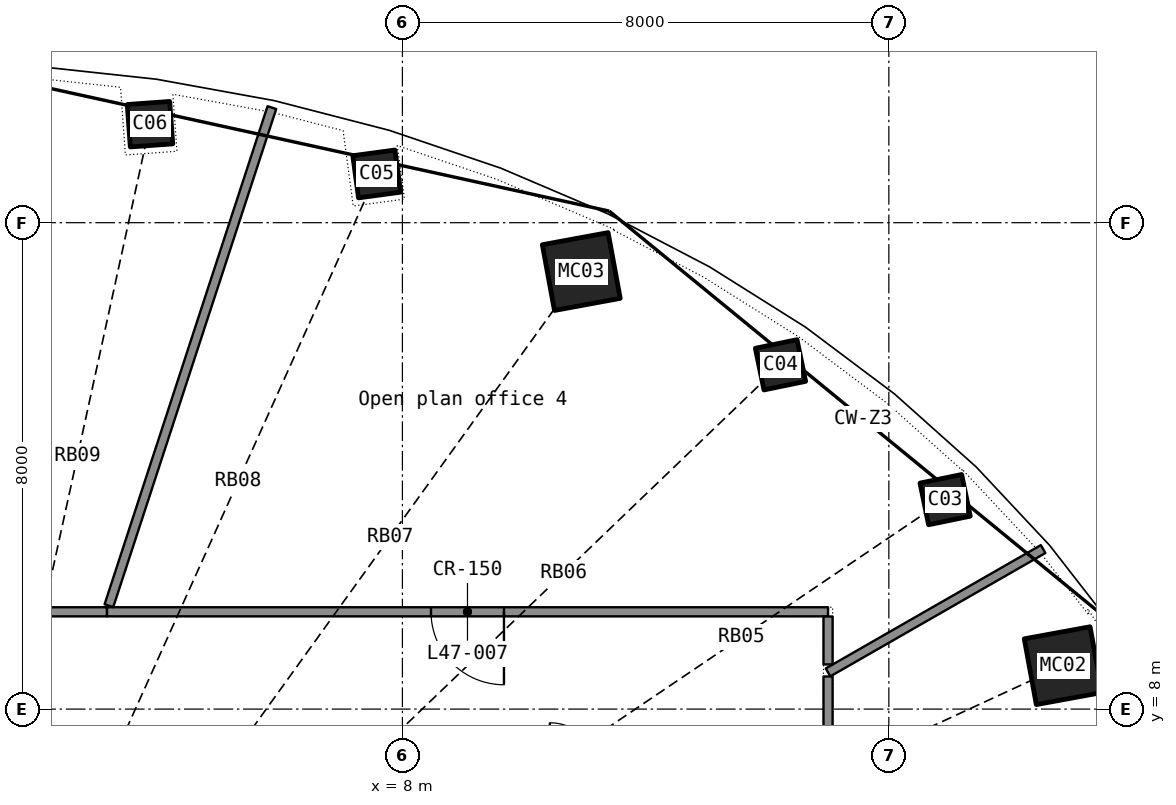
"""IFC4 building model, lengths in metres.
Left out: names, types, materials, properties, quantities, classifications, styles, units other than length and angle.
Written with IfcOpenShell. Run it as: python <this file> out.ifc"""

import sys

from ifc_helpers import new_model, si_unit, direction, frame, frame_2d, origin, origin_2d, place, context, subcontext, project, spatial, rectangle, hollow_rectangle, extrude, element, fill, save


model = new_model("IFC4")
c1 = context("Model", 3, precision=1e-05, world=origin(), true_north=direction((0.0, 1.0)))
c2 = subcontext(c1, "Body", "Model", "MODEL_VIEW")
j1 = project(units=[si_unit("LENGTHUNIT", "METRE"), si_unit("PLANEANGLEUNIT", "RADIAN")], contexts=[c1])
p1 = place(None, origin())
s1 = spatial("IfcSite", under=j1, at=p1, CompositionType="ELEMENT")
p2 = place(p1, origin())
s2 = spatial("IfcBuilding", under=s1, at=p2, CompositionType="ELEMENT")
p3 = place(p2, frame((0.0, 0.0, 194.1)))
s3 = spatial("IfcBuildingStorey", under=s2, at=p3, CompositionType="ELEMENT", Elevation=194.1)
p4 = place(p3, frame((18.867, 8.714, 0.0), z_axis=(-0.029940667, -0.01417895, 0.999451106), x_axis=(0.583859188, -0.811832967, 0.005973473)))
e1 = element("IfcColumn", 1, at=p4, inside=s3, PredefinedType="COLUMN", context=c2, shape_type="SweptSolid", body=[
    extrude(hollow_rectangle(XDim=1.1, YDim=1.1, WallThickness=0.032, at=origin_2d()), origin(), (0.0, 0.0, 1.0), 3.702),
])
p5 = place(p3, frame((16.926, 11.445, 0.0), z_axis=(-0.026512179, -0.018202391, 0.999482755), x_axis=(0.720419372, -0.693508429, 0.006479727)))
e2 = element("IfcColumn", 2, at=p5, inside=s3, PredefinedType="COLUMN", context=c2, shape_type="SweptSolid", body=[
    extrude(hollow_rectangle(XDim=0.7, YDim=0.7, WallThickness=0.025, at=origin_2d()), origin(), (0.0, 0.0, 1.0), 3.702),
])
p6 = place(p3, frame((14.218, 13.662, 0.0), z_axis=(-0.022226156, -0.021698532, 0.999517469), x_axis=(0.828497152, -0.559958207, 0.00626706)))
e3 = element("IfcColumn", 3, at=p6, inside=s3, PredefinedType="COLUMN", context=c2, shape_type="SweptSolid", body=[
    extrude(hollow_rectangle(XDim=0.7, YDim=0.7, WallThickness=0.025, at=origin_2d()), origin(), (0.0, 0.0, 1.0), 3.702),
])
p7 = place(p3, frame((10.942, 15.197, 0.0), z_axis=(-0.017280237, -0.024535299, 0.999549605), x_axis=(0.908373055, -0.418125333, 0.005440522)))
e4 = element("IfcColumn", 4, at=p7, inside=s3, PredefinedType="COLUMN", context=c2, shape_type="SweptSolid", body=[
    extrude(hollow_rectangle(XDim=1.1, YDim=1.1, WallThickness=0.032, at=origin_2d()), origin(), (0.0, 0.0, 1.0), 3.702),
])
for number, where, z_axis, x_axis in (
    (5, (7.578, 16.802, 0.0), (-0.012, -0.027, 1.0), (0.96, -0.281, 0.004)),
    (6, (3.849, 17.62, 0.0), (-0.006, -0.028, 1.0), (0.99, -0.14, 0.002)),
):
    element("IfcColumn", number, at=place(p3, frame(where, z_axis=z_axis, x_axis=x_axis)), inside=s3, PredefinedType="COLUMN", context=c2, shape_type="SweptSolid", body=[
        extrude(hollow_rectangle(XDim=0.7, YDim=0.7, WallThickness=0.025, at=origin_2d()), origin(), (0.0, 0.0, 1.0), 3.701),
    ])
p8 = place(p3, frame((15.0, 9.6, 0.0), z_axis=(0.0, 0.0, 1.0), x_axis=(-1.0, 0.0, 0.0)))
e7 = element("IfcWall", 7, at=p8, inside=s3, PredefinedType="PARTITIONING", context=c2, shape_type="SweptSolid", body=[
    extrude(rectangle(XDim=11.86, YDim=0.15, at=frame_2d((5.93, 0.0))), origin(), (0.0, 0.0, 1.0), 2.4),
])
p9 = place(p8, frame((5.33, 0.0, 0.0)))
e8 = element("IfcOpeningElement", 8, at=p9, cuts=e7, PredefinedType="OPENING", context=c2, shape_type="SweptSolid", body=[
    extrude(rectangle(XDim=1.2, YDim=2.2, at=frame_2d((0.6, 1.1))), frame((0.0, 0.085, 0.0), z_axis=(0.0, -1.0, 0.0), x_axis=(1.0, 0.0, 0.0)), (0.0, 0.0, 1.0), 0.17),
])
p10 = place(p3, frame((5.853, 17.893, 0.0), z_axis=(0.0, 0.0, 1.0), x_axis=(-0.310929285, -0.950433049, 0.0)))
e9 = element("IfcWall", 9, at=p10, inside=s3, PredefinedType="PARTITIONING", context=c2, shape_type="SweptSolid", body=[
    extrude(rectangle(XDim=8.62, YDim=0.15, at=frame_2d((4.31, 0.0))), origin(), (0.0, 0.0, 1.0), 2.4),
])
p11 = place(p3, frame((3.14, 9.6, 0.0), z_axis=(0.0, 0.0, 1.0), x_axis=(-1.0, 0.0, 0.0)))
e10 = element("IfcWall", 10, at=p11, inside=s3, PredefinedType="PARTITIONING", context=c2, shape_type="SweptSolid", body=[
    extrude(rectangle(XDim=6.208, YDim=0.15, at=frame_2d((3.104, 0.0))), origin(), (0.0, 0.0, 1.0), 2.4),
])
p12 = place(p11, frame((2.504, 0.0, 0.0)))
e11 = element("IfcOpeningElement", 11, at=p12, cuts=e10, PredefinedType="OPENING", context=c2, shape_type="SweptSolid", body=[
    extrude(rectangle(XDim=1.2, YDim=2.2, at=frame_2d((0.6, 1.1))), frame((0.0, 0.085, 0.0), z_axis=(0.0, -1.0, 0.0), x_axis=(1.0, 0.0, 0.0)), (0.0, 0.0, 1.0), 0.17),
])
p13 = place(p3, frame((18.537, 10.632, 0.0), z_axis=(0.0, 0.0, 1.0), x_axis=(-0.867438786, -0.49754392, 0.0)))
e12 = element("IfcWall", 12, at=p13, inside=s3, PredefinedType="PARTITIONING", context=c2, shape_type="SweptSolid", body=[
    extrude(rectangle(XDim=4.078, YDim=0.15, at=frame_2d((2.039, 0.0))), origin(), (0.0, 0.0, 1.0), 2.4),
])
p14 = place(p3, frame((15.0, 7.213, 0.0), z_axis=(0.0, 0.0, 1.0), x_axis=(0.0, 1.0, 0.0)))
e13 = element("IfcWall", 13, at=p14, inside=s3, PredefinedType="PARTITIONING", context=c2, shape_type="SweptSolid", body=[
    extrude(rectangle(XDim=1.323, YDim=0.15, at=frame_2d((0.662, 0.0))), origin(), (0.0, 0.0, 1.0), 2.4),
])
p15 = place(p3, frame((15.0, 8.735, 0.0), z_axis=(0.0, 0.0, 1.0), x_axis=(0.0, 1.0, 0.0)))
e14 = element("IfcWall", 14, at=p15, inside=s3, PredefinedType="PARTITIONING", context=c2, shape_type="SweptSolid", body=[
    extrude(rectangle(XDim=0.788, YDim=0.15, at=frame_2d((0.394, 0.0))), origin(), (0.0, 0.0, 1.0), 2.4),
])
p16 = place(p9, origin())
e15 = element("IfcDoor", 15, at=p16, inside=s3, OperationType="DOUBLE_DOOR_SINGLE_SWING", PredefinedType="DOOR", context=c2, shape_type="SweptSolid", body=[
    extrude(rectangle(XDim=1.2, YDim=2.2, at=frame_2d((0.6, 1.1))), frame((0.0, 0.025, 0.0), z_axis=(0.0, -1.0, 0.0), x_axis=(1.0, 0.0, 0.0)), (0.0, 0.0, 1.0), 0.05),
])
fill(e8, e15)
save(model, sys.argv[1])
